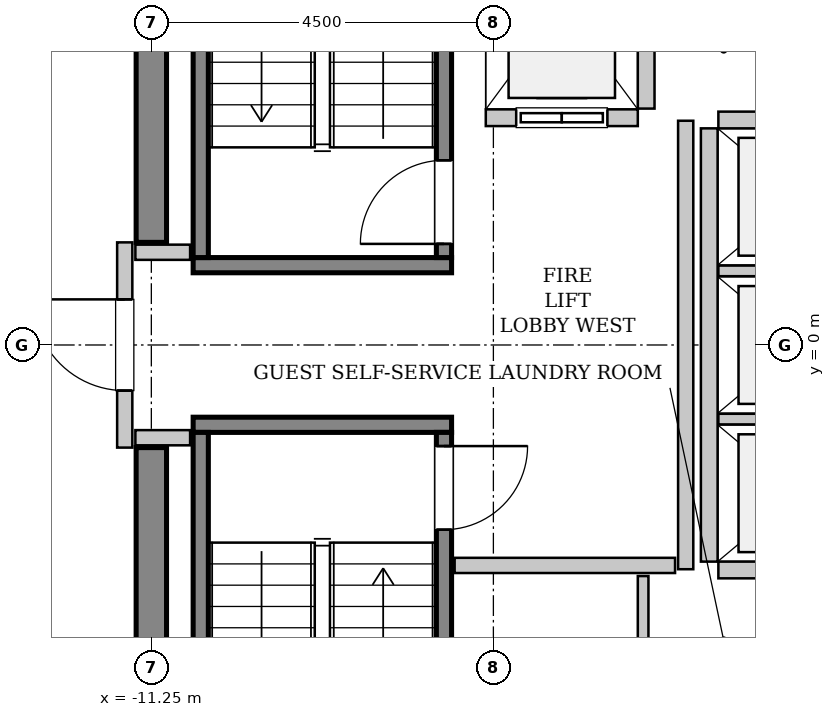
"""IFC4 building model, lengths in metres.
Left out: names, types, materials, properties, quantities, classifications, styles, units other than length and angle.
Written with IfcOpenShell. Run it as: python <this file> out.ifc"""

import sys

from ifc_helpers import new_model, si_unit, direction, frame, frame_2d, origin, place, context, subcontext, project, spatial, rectangle, extrude, source, transform, mapped, element, fill, save


model = new_model("IFC4")
c1 = context("Model", 3, precision=1e-05, world=origin(), true_north=direction((0.0, 1.0)))
c2 = subcontext(c1, "Body", "Model", "MODEL_VIEW")
j1 = project(units=[si_unit("LENGTHUNIT", "METRE"), si_unit("PLANEANGLEUNIT", "RADIAN")], contexts=[c1])
p1 = place(None, origin())
s1 = spatial("IfcSite", under=j1, at=p1, CompositionType="ELEMENT")
p2 = place(p1, origin())
s2 = spatial("IfcBuilding", under=s1, at=p2, CompositionType="ELEMENT")
p3 = place(p2, frame((0.0, 0.0, 345.2)))
s3 = spatial("IfcBuildingStorey", under=s2, at=p3, CompositionType="ELEMENT", Elevation=345.2)
m1 = source(origin(), c2, "Body", "SweptSolid", [
    extrude(rectangle(XDim=7.45, YDim=0.4, at=frame_2d((3.725, 0.0))), origin(), (0.0, 0.0, 1.0), 3.8),
])
for number, where, z_axis, x_axis in (
    (1, (-11.25, -8.8, 0.0), (0.0, 0.0, 1.0), (0.0, 1.0, 0.0)),
    (2, (-11.25, 1.35, 0.0), (0.0, 0.0, 1.0), (0.0, 1.0, 0.0)),
):
    element("IfcWall", number, at=place(p3, frame(where, z_axis=z_axis, x_axis=x_axis)), inside=s3, PredefinedType="SHEAR", context=c2, shape_type="MappedRepresentation", body=[
        mapped(m1, transform((0.0, 0.0, 0.0), x_axis=(1.0, 0.0, 0.0), y_axis=(0.0, 1.0, 0.0), z_axis=(0.0, 0.0, 1.0), scale=1.0)),
    ])
m2 = source(origin(), c2, "Body", "SweptSolid", [
    extrude(rectangle(XDim=3.4, YDim=0.2, at=frame_2d((1.7, 0.0))), origin(), (0.0, 0.0, 1.0), 3.8),
])
p4 = place(p3, frame((-7.3, 1.05, 0.0), z_axis=(0.0, 0.0, 1.0), x_axis=(-1.0, 0.0, 0.0)))
e3 = element("IfcWall", 3, at=p4, inside=s3, PredefinedType="SOLIDWALL", context=c2, shape_type="MappedRepresentation", body=[
    mapped(m2, transform((0.0, 0.0, 0.0), x_axis=(1.0, 0.0, 0.0), y_axis=(0.0, 1.0, 0.0), z_axis=(0.0, 0.0, 1.0), scale=1.0)),
])
m3 = source(origin(), c2, "Body", "SweptSolid", [
    extrude(rectangle(XDim=7.1, YDim=0.2, at=frame_2d((3.55, 0.0))), origin(), (0.0, 0.0, 1.0), 3.8),
])
p5 = place(p3, frame((-7.4, 1.15, 0.0), z_axis=(0.0, 0.0, 1.0), x_axis=(0.0, 1.0, 0.0)))
e4 = element("IfcWall", 4, at=p5, inside=s3, PredefinedType="SOLIDWALL", context=c2, shape_type="MappedRepresentation", body=[
    mapped(m3, transform((0.0, 0.0, 0.0), x_axis=(1.0, 0.0, 0.0), y_axis=(0.0, 1.0, 0.0), z_axis=(0.0, 0.0, 1.0), scale=1.0)),
])
p6 = place(p5, frame((0.18, 0.0, 0.0)))
e5 = element("IfcOpeningElement", 5, at=p6, cuts=e4, PredefinedType="OPENING", context=c2, shape_type="SweptSolid", body=[
    extrude(rectangle(XDim=1.1, YDim=2.15, at=frame_2d((0.55, 1.075))), frame((0.0, 0.11, 0.0), z_axis=(0.0, -1.0, 0.0), x_axis=(1.0, 0.0, 0.0)), (0.0, 0.0, 1.0), 0.22),
])
p7 = place(p3, frame((-10.6, 1.15, 0.0), z_axis=(0.0, 0.0, 1.0), x_axis=(0.0, 1.0, 0.0)))
e6 = element("IfcWall", 6, at=p7, inside=s3, PredefinedType="SOLIDWALL", context=c2, shape_type="MappedRepresentation", body=[
    mapped(m3, transform((0.0, 0.0, 0.0), x_axis=(1.0, 0.0, 0.0), y_axis=(0.0, 1.0, 0.0), z_axis=(0.0, 0.0, 1.0), scale=1.0)),
])
p8 = place(p3, frame((-10.7, -1.05, 0.0), z_axis=(0.0, 0.0, 1.0), x_axis=(1.0, 0.0, 0.0)))
e7 = element("IfcWall", 7, at=p8, inside=s3, PredefinedType="SOLIDWALL", context=c2, shape_type="MappedRepresentation", body=[
    mapped(m2, transform((0.0, 0.0, 0.0), x_axis=(1.0, 0.0, 0.0), y_axis=(0.0, 1.0, 0.0), z_axis=(0.0, 0.0, 1.0), scale=1.0)),
])
p9 = place(p3, frame((-10.6, -1.15, 0.0), z_axis=(0.0, 0.0, 1.0), x_axis=(0.0, -1.0, 0.0)))
e8 = element("IfcWall", 8, at=p9, inside=s3, PredefinedType="SOLIDWALL", context=c2, shape_type="MappedRepresentation", body=[
    mapped(m3, transform((0.0, 0.0, 0.0), x_axis=(1.0, 0.0, 0.0), y_axis=(0.0, 1.0, 0.0), z_axis=(0.0, 0.0, 1.0), scale=1.0)),
])
p10 = place(p3, frame((-7.4, -1.15, 0.0), z_axis=(0.0, 0.0, 1.0), x_axis=(0.0, -1.0, 0.0)))
e9 = element("IfcWall", 9, at=p10, inside=s3, PredefinedType="SOLIDWALL", context=c2, shape_type="MappedRepresentation", body=[
    mapped(m3, transform((0.0, 0.0, 0.0), x_axis=(1.0, 0.0, 0.0), y_axis=(0.0, 1.0, 0.0), z_axis=(0.0, 0.0, 1.0), scale=1.0)),
])
p11 = place(p10, frame((0.18, 0.0, 0.0)))
e10 = element("IfcOpeningElement", 10, at=p11, cuts=e9, PredefinedType="OPENING", context=c2, shape_type="SweptSolid", body=[
    extrude(rectangle(XDim=1.1, YDim=2.15, at=frame_2d((0.55, 1.075))), frame((0.0, 0.11, 0.0), z_axis=(0.0, -1.0, 0.0), x_axis=(1.0, 0.0, 0.0)), (0.0, 0.0, 1.0), 0.22),
])
m4 = source(origin(), c2, "Body", "SweptSolid", [
    extrude(rectangle(XDim=2.0, YDim=0.22, at=frame_2d((1.0, 0.0))), origin(), (0.0, 0.0, 1.0), 3.485),
])
p12 = place(p3, frame((-6.85, 2.99, 0.0), z_axis=(0.0, 0.0, 1.0), x_axis=(1.0, 0.0, 0.0)))
e11 = element("IfcWall", 11, at=p12, inside=s3, PredefinedType="SOLIDWALL", context=c2, shape_type="MappedRepresentation", body=[
    mapped(m4, transform((0.0, 0.0, 0.0), x_axis=(1.0, 0.0, 0.0), y_axis=(0.0, 1.0, 0.0), z_axis=(0.0, 0.0, 1.0), scale=1.0)),
])
p13 = place(p12, frame((0.4, 0.0, 0.0)))
e12 = element("IfcOpeningElement", 12, at=p13, cuts=e11, PredefinedType="OPENING", context=c2, shape_type="SweptSolid", body=[
    extrude(rectangle(XDim=1.2, YDim=2.2, at=frame_2d((0.6, 1.1))), frame((0.0, 0.12, 0.0), z_axis=(0.0, -1.0, 0.0), x_axis=(1.0, 0.0, 0.0)), (0.0, 0.0, 1.0), 0.24),
])
m5 = source(origin(), c2, "Body", "SweptSolid", [
    extrude(rectangle(XDim=2.68, YDim=0.22, at=frame_2d((1.34, 0.0))), origin(), (0.0, 0.0, 1.0), 3.485),
])
p14 = place(p3, frame((-4.74, 3.11, 0.0), z_axis=(0.0, 0.0, 1.0), x_axis=(0.0, 1.0, 0.0)))
e13 = element("IfcWall", 13, at=p14, inside=s3, PredefinedType="SOLIDWALL", context=c2, shape_type="MappedRepresentation", body=[
    mapped(m5, transform((0.0, 0.0, 0.0), x_axis=(1.0, 0.0, 0.0), y_axis=(0.0, 1.0, 0.0), z_axis=(0.0, 0.0, 1.0), scale=1.0)),
])
m6 = source(origin(), c2, "Body", "SweptSolid", [
    extrude(rectangle(XDim=5.7, YDim=0.22, at=frame_2d((2.85, 0.0))), origin(), (0.0, 0.0, 1.0), 3.485),
])
p15 = place(p3, frame((-3.91, 2.85, 0.0), z_axis=(0.0, 0.0, 1.0), x_axis=(0.0, -1.0, 0.0)))
e14 = element("IfcWall", 14, at=p15, inside=s3, PredefinedType="SOLIDWALL", context=c2, shape_type="MappedRepresentation", body=[
    mapped(m6, transform((0.0, 0.0, 0.0), x_axis=(1.0, 0.0, 0.0), y_axis=(0.0, 1.0, 0.0), z_axis=(0.0, 0.0, 1.0), scale=1.0)),
])
m7 = source(origin(), c2, "Body", "SweptSolid", [
    extrude(rectangle(XDim=2.13, YDim=0.22, at=frame_2d((1.065, 0.0))), origin(), (0.0, 0.0, 1.0), 3.485),
])
p16 = place(p3, frame((-3.79, -2.96, 0.0), z_axis=(0.0, 0.0, 1.0), x_axis=(1.0, 0.0, 0.0)))
e15 = element("IfcWall", 15, at=p16, inside=s3, PredefinedType="SOLIDWALL", context=c2, shape_type="MappedRepresentation", body=[
    mapped(m7, transform((0.0, 0.0, 0.0), x_axis=(1.0, 0.0, 0.0), y_axis=(0.0, 1.0, 0.0), z_axis=(0.0, 0.0, 1.0), scale=1.0)),
])
m8 = source(origin(), c2, "Body", "SweptSolid", [
    extrude(rectangle(XDim=2.13, YDim=0.14, at=frame_2d((1.065, 0.0))), origin(), (0.0, 0.0, 1.0), 3.485),
])
for number, where, z_axis, x_axis in (
    (16, (-3.79, -0.975, 0.0), (0.0, 0.0, 1.0), (1.0, 0.0, 0.0)),
    (17, (-3.79, 0.975, 0.0), (0.0, 0.0, 1.0), (1.0, 0.0, 0.0)),
):
    element("IfcWall", number, at=place(p3, frame(where, z_axis=z_axis, x_axis=x_axis)), inside=s3, PredefinedType="PARTITIONING", context=c2, shape_type="MappedRepresentation", body=[
        mapped(m8, transform((0.0, 0.0, 0.0), x_axis=(1.0, 0.0, 0.0), y_axis=(0.0, 1.0, 0.0), z_axis=(0.0, 0.0, 1.0), scale=1.0)),
    ])
p17 = place(p3, frame((-1.66, 2.96, 0.0), z_axis=(0.0, 0.0, 1.0), x_axis=(-1.0, 0.0, 0.0)))
e18 = element("IfcWall", 18, at=p17, inside=s3, PredefinedType="SOLIDWALL", context=c2, shape_type="MappedRepresentation", body=[
    mapped(m7, transform((0.0, 0.0, 0.0), x_axis=(1.0, 0.0, 0.0), y_axis=(0.0, 1.0, 0.0), z_axis=(0.0, 0.0, 1.0), scale=1.0)),
])
m9 = source(origin(), c2, "Body", "SweptSolid", [
    extrude(rectangle(XDim=2.7, YDim=0.2, at=frame_2d((1.35, 0.0))), origin(), (0.0, 0.0, 1.0), 2.575),
])
p18 = place(p3, frame((-11.6, -1.35, 0.0), z_axis=(0.0, 0.0, 1.0), x_axis=(0.0, 1.0, 0.0)))
e19 = element("IfcWall", 19, at=p18, inside=s3, PredefinedType="PARTITIONING", context=c2, shape_type="MappedRepresentation", body=[
    mapped(m9, transform((0.0, 0.0, 0.0), x_axis=(1.0, 0.0, 0.0), y_axis=(0.0, 1.0, 0.0), z_axis=(0.0, 0.0, 1.0), scale=1.0)),
])
p19 = place(p18, frame((0.75, 0.0, 0.0)))
e20 = element("IfcOpeningElement", 20, at=p19, cuts=e19, PredefinedType="OPENING", context=c2, shape_type="SweptSolid", body=[
    extrude(rectangle(XDim=1.2, YDim=2.15, at=frame_2d((0.6, 1.075))), frame((0.0, 0.11, 0.0), z_axis=(0.0, -1.0, 0.0), x_axis=(1.0, 0.0, 0.0)), (0.0, 0.0, 1.0), 0.22),
])
m10 = source(origin(), c2, "Body", "SweptSolid", [
    extrude(rectangle(XDim=5.9, YDim=0.2, at=frame_2d((2.95, 0.0))), origin(), (0.0, 0.0, 1.0), 3.485),
])
p20 = place(p3, frame((-4.22, -2.95, 0.0), z_axis=(0.0, 0.0, 1.0), x_axis=(0.0, 1.0, 0.0)))
e21 = element("IfcWall", 21, at=p20, inside=s3, PredefinedType="PARTITIONING", context=c2, shape_type="MappedRepresentation", body=[
    mapped(m10, transform((0.0, 0.0, 0.0), x_axis=(1.0, 0.0, 0.0), y_axis=(0.0, 1.0, 0.0), z_axis=(0.0, 0.0, 1.0), scale=1.0)),
])
m11 = source(origin(), c2, "Body", "SweptSolid", [
    extrude(rectangle(XDim=2.9, YDim=0.2, at=frame_2d((1.45, 0.0))), origin(), (0.0, 0.0, 1.0), 3.485),
])
p21 = place(p3, frame((-7.26, -2.9, 0.0), z_axis=(0.0, 0.0, 1.0), x_axis=(1.0, 0.0, 0.0)))
e22 = element("IfcWall", 22, at=p21, inside=s3, PredefinedType="PARTITIONING", context=c2, shape_type="MappedRepresentation", body=[
    mapped(m11, transform((0.0, 0.0, 0.0), x_axis=(1.0, 0.0, 0.0), y_axis=(0.0, 1.0, 0.0), z_axis=(0.0, 0.0, 1.0), scale=1.0)),
])
m12 = source(origin(), c2, "Body", "SweptSolid", [
    extrude(rectangle(XDim=0.72, YDim=0.2, at=frame_2d((0.36, 0.0))), origin(), (0.0, 0.0, 1.0), 3.485),
])
for number, where, z_axis, x_axis in (
    (23, (-11.46, 1.22, 0.0), (0.0, 0.0, 1.0), (1.0, 0.0, 0.0)),
    (24, (-11.46, -1.22, 0.0), (0.0, 0.0, 1.0), (1.0, 0.0, 0.0)),
):
    element("IfcWall", number, at=place(p3, frame(where, z_axis=z_axis, x_axis=x_axis)), inside=s3, PredefinedType="PARTITIONING", context=c2, shape_type="MappedRepresentation", body=[
        mapped(m12, transform((0.0, 0.0, 0.0), x_axis=(1.0, 0.0, 0.0), y_axis=(0.0, 1.0, 0.0), z_axis=(0.0, 0.0, 1.0), scale=1.0)),
    ])
m13 = source(origin(), c2, "Body", "SweptSolid", [
    extrude(rectangle(XDim=1.6, YDim=0.14, at=frame_2d((0.8, 0.0))), origin(), (0.0, 0.0, 1.0), 3.485),
])
p22 = place(p3, frame((-4.78, -4.64, 0.0), z_axis=(0.0, 0.0, 1.0), x_axis=(0.0, 1.0, 0.0)))
e25 = element("IfcWall", 25, at=p22, inside=s3, PredefinedType="PARTITIONING", context=c2, shape_type="MappedRepresentation", body=[
    mapped(m13, transform((0.0, 0.0, 0.0), x_axis=(1.0, 0.0, 0.0), y_axis=(0.0, 1.0, 0.0), z_axis=(0.0, 0.0, 1.0), scale=1.0)),
])
m14 = source(origin(), c2, "Body", "SweptSolid", [
    extrude(rectangle(XDim=1.1, YDim=2.15, at=frame_2d((0.55, 1.075))), frame((0.0, 0.025, 0.0), z_axis=(0.0, -1.0, 0.0), x_axis=(1.0, 0.0, 0.0)), (0.0, 0.0, 1.0), 0.05),
])
p23 = place(p6, origin())
e26 = element("IfcDoor", 26, at=p23, inside=s3, OperationType="SINGLE_SWING_LEFT", PredefinedType="DOOR", context=c2, shape_type="MappedRepresentation", body=[
    mapped(m14, transform((0.0, 0.0, 0.0), x_axis=(1.0, 0.0, 0.0), y_axis=(0.0, 1.0, 0.0), z_axis=(0.0, 0.0, 1.0), scale=1.0)),
])
fill(e5, e26)
p24 = place(p11, origin())
e27 = element("IfcDoor", 27, at=p24, inside=s3, OperationType="SINGLE_SWING_LEFT", PredefinedType="DOOR", context=c2, shape_type="MappedRepresentation", body=[
    mapped(m14, transform((0.0, 0.0, 0.0), x_axis=(1.0, 0.0, 0.0), y_axis=(0.0, 1.0, 0.0), z_axis=(0.0, 0.0, 1.0), scale=1.0)),
])
fill(e10, e27)
m15 = source(origin(), c2, "Body", "SweptSolid", [
    extrude(rectangle(XDim=1.2, YDim=2.2, at=frame_2d((0.6, 1.1))), frame((0.0, 0.025, 0.0), z_axis=(0.0, -1.0, 0.0), x_axis=(1.0, 0.0, 0.0)), (0.0, 0.0, 1.0), 0.05),
])
p25 = place(p13, origin())
e28 = element("IfcDoor", 28, at=p25, inside=s3, OperationType="SLIDING_TO_LEFT", PredefinedType="DOOR", context=c2, shape_type="MappedRepresentation", body=[
    mapped(m15, transform((0.0, 0.0, 0.0), x_axis=(1.0, 0.0, 0.0), y_axis=(0.0, 1.0, 0.0), z_axis=(0.0, 0.0, 1.0), scale=1.0)),
])
fill(e12, e28)
m16 = source(origin(), c2, "Body", "SweptSolid", [
    extrude(rectangle(XDim=1.2, YDim=2.15, at=frame_2d((0.6, 1.075))), frame((0.0, 0.025, 0.0), z_axis=(0.0, -1.0, 0.0), x_axis=(1.0, 0.0, 0.0)), (0.0, 0.0, 1.0), 0.05),
])
p26 = place(p19, origin())
e29 = element("IfcDoor", 29, at=p26, inside=s3, OperationType="SINGLE_SWING_RIGHT", PredefinedType="DOOR", context=c2, shape_type="MappedRepresentation", body=[
    mapped(m16, transform((0.0, 0.0, 0.0), x_axis=(1.0, 0.0, 0.0), y_axis=(0.0, 1.0, 0.0), z_axis=(0.0, 0.0, 1.0), scale=1.0)),
])
fill(e20, e29)
save(model, sys.argv[1])
